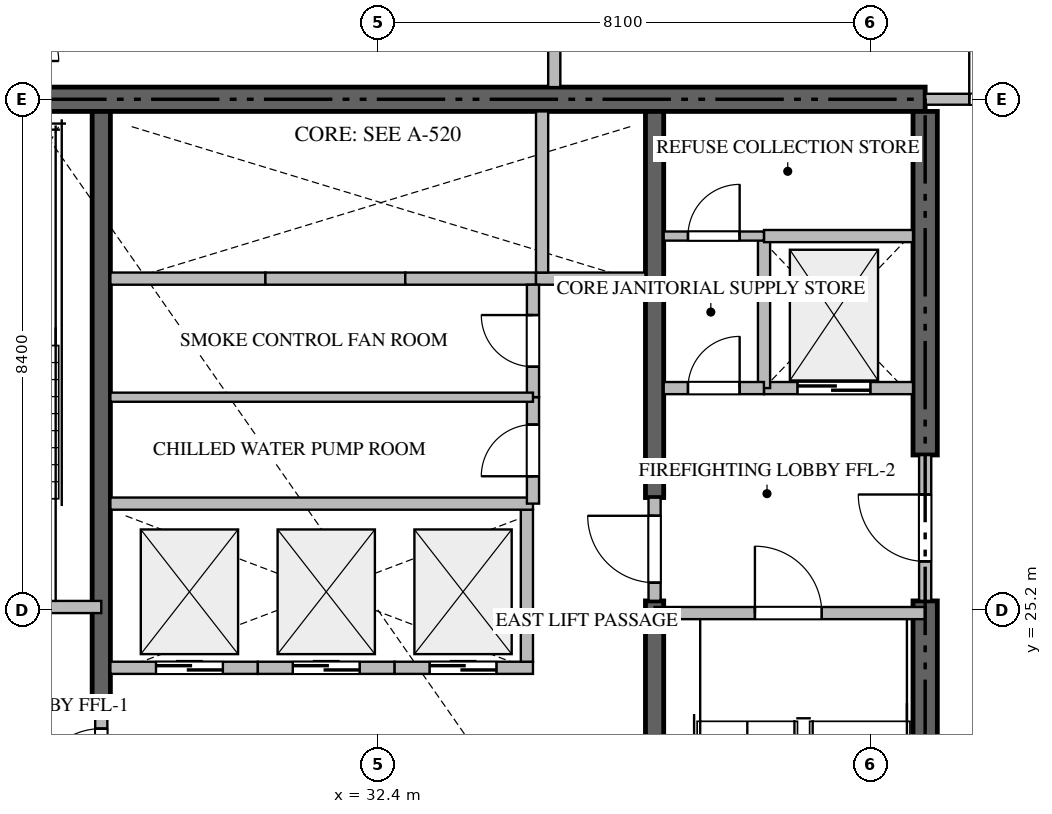
"""IFC4 building model, lengths in metres.
Left out: names, types, materials, properties, quantities, classifications, styles, units other than length and angle.
Written with IfcOpenShell. Run it as: python <this file> out.ifc"""

import sys

from ifc_helpers import new_model, si_unit, direction, frame, frame_2d, origin, place, context, subcontext, project, spatial, rectangle, extrude, source, transform, mapped, element, fill, save


model = new_model("IFC4")
c1 = context("Model", 3, precision=1e-05, world=origin(), true_north=direction((0.0, 1.0)))
c2 = subcontext(c1, "Body", "Model", "MODEL_VIEW")
j1 = project(units=[si_unit("LENGTHUNIT", "METRE"), si_unit("PLANEANGLEUNIT", "RADIAN")], contexts=[c1])
p1 = place(None, origin())
s1 = spatial("IfcSite", under=j1, at=p1, CompositionType="ELEMENT")
p2 = place(p1, origin())
s2 = spatial("IfcBuilding", under=s1, at=p2, CompositionType="ELEMENT")
p3 = place(p2, frame((0.0, 0.0, 191.4)))
s3 = spatial("IfcBuildingStorey", under=s2, at=p3, CompositionType="ELEMENT", Elevation=191.4)
p4 = place(p3, frame((41.4, 33.6, -0.26), z_axis=(0.0, 0.0, 1.0), x_axis=(-1.0, 0.0, 0.0)))
e1 = element("IfcWall", 1, at=p4, inside=s3, PredefinedType="SHEAR", context=c2, shape_type="SweptSolid", body=[
    extrude(rectangle(XDim=18.0, YDim=0.4, at=frame_2d((9.0, 0.0))), origin(), (0.0, 0.0, 1.0), 3.748),
])
p5 = place(p3, frame((41.4, 17.0, -0.26), z_axis=(0.0, 0.0, 1.0), x_axis=(0.0, 1.0, 0.0)))
e2 = element("IfcWall", 2, at=p5, inside=s3, PredefinedType="SHEAR", context=c2, shape_type="SweptSolid", body=[
    extrude(rectangle(XDim=8.35, YDim=0.4, at=frame_2d((4.175, 0.0))), origin(), (0.0, 0.0, 1.0), 3.748),
])
p6 = place(p3, frame((41.4, 27.75, -0.26), z_axis=(0.0, 0.0, 1.0), x_axis=(0.0, 1.0, 0.0)))
e3 = element("IfcWall", 3, at=p6, inside=s3, PredefinedType="SHEAR", context=c2, shape_type="SweptSolid", body=[
    extrude(rectangle(XDim=5.65, YDim=0.4, at=frame_2d((2.825, 0.0))), origin(), (0.0, 0.0, 1.0), 3.748),
])
p7 = place(p3, frame((27.85, 23.55, -0.26), z_axis=(0.0, 0.0, 1.0), x_axis=(0.0, 1.0, 0.0)))
e4 = element("IfcWall", 4, at=p7, inside=s3, PredefinedType="SHEAR", context=c2, shape_type="SweptSolid", body=[
    extrude(rectangle(XDim=9.85, YDim=0.3, at=frame_2d((4.925, 0.0))), origin(), (0.0, 0.0, 1.0), 3.748),
])
p8 = place(p3, frame((36.95, 17.0, -0.26), z_axis=(0.0, 0.0, 1.0), x_axis=(0.0, 1.0, 0.0)))
e5 = element("IfcWall", 5, at=p8, inside=s3, PredefinedType="SHEAR", context=c2, shape_type="SweptSolid", body=[
    extrude(rectangle(XDim=8.35, YDim=0.3, at=frame_2d((4.175, 0.0))), origin(), (0.0, 0.0, 1.0), 3.748),
])
p9 = place(p3, frame((36.95, 27.05, -0.26), z_axis=(0.0, 0.0, 1.0), x_axis=(0.0, 1.0, 0.0)))
e6 = element("IfcWall", 6, at=p9, inside=s3, PredefinedType="SHEAR", context=c2, shape_type="SweptSolid", body=[
    extrude(rectangle(XDim=6.35, YDim=0.3, at=frame_2d((3.175, 0.0))), origin(), (0.0, 0.0, 1.0), 3.748),
])
p10 = place(p3, frame((23.4, 25.25, 0.0), z_axis=(0.0, 0.0, 1.0), x_axis=(1.0, 0.0, 0.0)))
e7 = element("IfcWall", 7, at=p10, inside=s3, PredefinedType="STANDARD", context=c2, shape_type="SweptSolid", body=[
    extrude(rectangle(XDim=4.45, YDim=0.2, at=frame_2d((2.225, 0.0))), origin(), (0.0, 0.0, 1.0), 3.49),
])
p11 = place(p10, frame((1.65, 0.0, 0.0)))
e8 = element("IfcOpeningElement", 8, at=p11, cuts=e7, PredefinedType="OPENING", context=c2, shape_type="SweptSolid", body=[
    extrude(rectangle(XDim=1.1, YDim=2.15, at=frame_2d((0.55, 1.075))), frame((0.0, 0.11, 0.0), z_axis=(0.0, -1.0, 0.0), x_axis=(1.0, 0.0, 0.0)), (0.0, 0.0, 1.0), 0.22),
])
p12 = place(p3, frame((36.95, 25.15, 0.0), z_axis=(0.0, 0.0, 1.0), x_axis=(1.0, 0.0, 0.0)))
e9 = element("IfcWall", 9, at=p12, inside=s3, PredefinedType="STANDARD", context=c2, shape_type="SweptSolid", body=[
    extrude(rectangle(XDim=4.45, YDim=0.2, at=frame_2d((2.225, 0.0))), origin(), (0.0, 0.0, 1.0), 3.49),
])
p13 = place(p12, frame((1.65, 0.0, 0.0)))
e10 = element("IfcOpeningElement", 10, at=p13, cuts=e9, PredefinedType="OPENING", context=c2, shape_type="SweptSolid", body=[
    extrude(rectangle(XDim=1.1, YDim=2.15, at=frame_2d((0.55, 1.075))), frame((0.0, 0.11, 0.0), z_axis=(0.0, -1.0, 0.0), x_axis=(1.0, 0.0, 0.0)), (0.0, 0.0, 1.0), 0.22),
])
p14 = place(p3, frame((38.75, 28.85, 0.0), z_axis=(0.0, 0.0, 1.0), x_axis=(1.0, 0.0, 0.0)))
e11 = element("IfcWall", 11, at=p14, inside=s3, PredefinedType="STANDARD", context=c2, shape_type="SweptSolid", body=[
    extrude(rectangle(XDim=2.45, YDim=0.2, at=frame_2d((1.225, 0.0))), origin(), (0.0, 0.0, 1.0), 3.49),
])
p15 = place(p14, frame((0.55, 0.0, 0.0)))
e12 = element("IfcOpeningElement", 12, at=p15, cuts=e11, PredefinedType="OPENING", context=c2, shape_type="SweptSolid", body=[
    extrude(rectangle(XDim=1.2, YDim=2.2, at=frame_2d((0.6, 1.1))), frame((0.0, 0.11, 0.0), z_axis=(0.0, -1.0, 0.0), x_axis=(1.0, 0.0, 0.0)), (0.0, 0.0, 1.0), 0.22),
])
p16 = place(p3, frame((28.0, 24.25, 0.0), z_axis=(0.0, 0.0, 1.0), x_axis=(1.0, 0.0, 0.0)))
e13 = element("IfcWall", 13, at=p16, inside=s3, PredefinedType="STANDARD", context=c2, shape_type="SweptSolid", body=[
    extrude(rectangle(XDim=2.425, YDim=0.2, at=frame_2d((1.212, 0.0))), origin(), (0.0, 0.0, 1.0), 3.49),
])
p17 = place(p16, frame((0.75, 0.0, 0.0)))
e14 = element("IfcOpeningElement", 14, at=p17, cuts=e13, PredefinedType="OPENING", context=c2, shape_type="SweptSolid", body=[
    extrude(rectangle(XDim=1.1, YDim=2.2, at=frame_2d((0.55, 1.1))), frame((0.0, 0.11, 0.0), z_axis=(0.0, -1.0, 0.0), x_axis=(1.0, 0.0, 0.0)), (0.0, 0.0, 1.0), 0.22),
])
p18 = place(p3, frame((30.425, 24.25, 0.0), z_axis=(0.0, 0.0, 1.0), x_axis=(1.0, 0.0, 0.0)))
e15 = element("IfcWall", 15, at=p18, inside=s3, PredefinedType="STANDARD", context=c2, shape_type="SweptSolid", body=[
    extrude(rectangle(XDim=2.25, YDim=0.2, at=frame_2d((1.125, 0.0))), origin(), (0.0, 0.0, 1.0), 3.49),
])
p19 = place(p18, frame((0.575, 0.0, 0.0)))
e16 = element("IfcOpeningElement", 16, at=p19, cuts=e15, PredefinedType="OPENING", context=c2, shape_type="SweptSolid", body=[
    extrude(rectangle(XDim=1.1, YDim=2.2, at=frame_2d((0.55, 1.1))), frame((0.0, 0.11, 0.0), z_axis=(0.0, -1.0, 0.0), x_axis=(1.0, 0.0, 0.0)), (0.0, 0.0, 1.0), 0.22),
])
p20 = place(p3, frame((32.675, 24.25, 0.0), z_axis=(0.0, 0.0, 1.0), x_axis=(1.0, 0.0, 0.0)))
e17 = element("IfcWall", 17, at=p20, inside=s3, PredefinedType="STANDARD", context=c2, shape_type="SweptSolid", body=[
    extrude(rectangle(XDim=2.275, YDim=0.2, at=frame_2d((1.137, 0.0))), origin(), (0.0, 0.0, 1.0), 3.49),
])
p21 = place(p20, frame((0.575, 0.0, 0.0)))
e18 = element("IfcOpeningElement", 18, at=p21, cuts=e17, PredefinedType="OPENING", context=c2, shape_type="SweptSolid", body=[
    extrude(rectangle(XDim=1.1, YDim=2.2, at=frame_2d((0.55, 1.1))), frame((0.0, 0.11, 0.0), z_axis=(0.0, -1.0, 0.0), x_axis=(1.0, 0.0, 0.0)), (0.0, 0.0, 1.0), 0.22),
])
p22 = place(p3, frame((34.85, 24.35, 0.0), z_axis=(0.0, 0.0, 1.0), x_axis=(0.0, 1.0, 0.0)))
e19 = element("IfcWall", 19, at=p22, inside=s3, PredefinedType="STANDARD", context=c2, shape_type="SweptSolid", body=[
    extrude(rectangle(XDim=2.5, YDim=0.2, at=frame_2d((1.25, 0.0))), origin(), (0.0, 0.0, 1.0), 3.49),
])
p23 = place(p3, frame((28.0, 30.65, 0.0), z_axis=(0.0, 0.0, 1.0), x_axis=(1.0, 0.0, 0.0)))
e20 = element("IfcWall", 20, at=p23, inside=s3, PredefinedType="STANDARD", context=c2, shape_type="SweptSolid", body=[
    extrude(rectangle(XDim=2.55, YDim=0.2, at=frame_2d((1.275, 0.0))), origin(), (0.0, 0.0, 1.0), 3.49),
])
p24 = place(p3, frame((30.55, 30.65, 0.0), z_axis=(0.0, 0.0, 1.0), x_axis=(1.0, 0.0, 0.0)))
e21 = element("IfcWall", 21, at=p24, inside=s3, PredefinedType="STANDARD", context=c2, shape_type="SweptSolid", body=[
    extrude(rectangle(XDim=2.3, YDim=0.2, at=frame_2d((1.15, 0.0))), origin(), (0.0, 0.0, 1.0), 3.49),
])
p25 = place(p3, frame((32.85, 30.65, 0.0), z_axis=(0.0, 0.0, 1.0), x_axis=(1.0, 0.0, 0.0)))
e22 = element("IfcWall", 22, at=p25, inside=s3, PredefinedType="STANDARD", context=c2, shape_type="SweptSolid", body=[
    extrude(rectangle(XDim=2.15, YDim=0.2, at=frame_2d((1.075, 0.0))), origin(), (0.0, 0.0, 1.0), 3.49),
])
p26 = place(p3, frame((35.0, 30.65, 0.0), z_axis=(0.0, 0.0, 1.0), x_axis=(1.0, 0.0, 0.0)))
e23 = element("IfcWall", 23, at=p26, inside=s3, PredefinedType="STANDARD", context=c2, shape_type="SweptSolid", body=[
    extrude(rectangle(XDim=1.8, YDim=0.2, at=frame_2d((0.9, 0.0))), origin(), (0.0, 0.0, 1.0), 3.49),
])
p27 = place(p3, frame((35.1, 30.75, 0.0), z_axis=(0.0, 0.0, 1.0), x_axis=(0.0, 1.0, 0.0)))
e24 = element("IfcWall", 24, at=p27, inside=s3, PredefinedType="STANDARD", context=c2, shape_type="SweptSolid", body=[
    extrude(rectangle(XDim=2.65, YDim=0.2, at=frame_2d((1.325, 0.0))), origin(), (0.0, 0.0, 1.0), 3.49),
])
p28 = place(p3, frame((38.75, 28.85, 0.0), z_axis=(0.0, 0.0, 1.0), x_axis=(0.0, 1.0, 0.0)))
e25 = element("IfcWall", 25, at=p28, inside=s3, PredefinedType="STANDARD", context=c2, shape_type="SweptSolid", body=[
    extrude(rectangle(XDim=2.5, YDim=0.2, at=frame_2d((1.25, 0.0))), origin(), (0.0, 0.0, 1.0), 3.49),
])
p29 = place(p3, frame((38.75, 31.35, 0.0), z_axis=(0.0, 0.0, 1.0), x_axis=(1.0, 0.0, 0.0)))
e26 = element("IfcWall", 26, at=p29, inside=s3, PredefinedType="STANDARD", context=c2, shape_type="SweptSolid", body=[
    extrude(rectangle(XDim=2.45, YDim=0.2, at=frame_2d((1.225, 0.0))), origin(), (0.0, 0.0, 1.0), 3.49),
])
p30 = place(p3, frame((37.1, 28.85, 0.0), z_axis=(0.0, 0.0, 1.0), x_axis=(1.0, 0.0, 0.0)))
e27 = element("IfcWall", 27, at=p30, inside=s3, PredefinedType="STANDARD", context=c2, shape_type="SweptSolid", body=[
    extrude(rectangle(XDim=1.648, YDim=0.2, at=frame_2d((0.824, 0.0))), origin(), (0.0, 0.0, 1.0), 3.49),
])
p31 = place(p30, frame((0.399, 0.0, 0.0)))
e28 = element("IfcOpeningElement", 28, at=p31, cuts=e27, PredefinedType="OPENING", context=c2, shape_type="SweptSolid", body=[
    extrude(rectangle(XDim=0.85, YDim=2.1, at=frame_2d((0.425, 1.05))), frame((0.0, 0.11, 0.0), z_axis=(0.0, -1.0, 0.0), x_axis=(1.0, 0.0, 0.0)), (0.0, 0.0, 1.0), 0.22),
])
p32 = place(p3, frame((41.4, 25.352, 0.0), z_axis=(0.0, 0.0, 1.0), x_axis=(0.0, 1.0, 0.0)))
e29 = element("IfcWall", 29, at=p32, inside=s3, PredefinedType="STANDARD", context=c2, shape_type="SweptSolid", body=[
    extrude(rectangle(XDim=2.396, YDim=0.2, at=frame_2d((1.198, 0.0))), origin(), (0.0, 0.0, 1.0), 3.49),
])
p33 = place(p32, frame((0.648, 0.0, 0.0)))
e30 = element("IfcOpeningElement", 30, at=p33, cuts=e29, PredefinedType="OPENING", context=c2, shape_type="SweptSolid", body=[
    extrude(rectangle(XDim=1.1, YDim=2.15, at=frame_2d((0.55, 1.075))), frame((0.0, 0.11, 0.0), z_axis=(0.0, -1.0, 0.0), x_axis=(1.0, 0.0, 0.0)), (0.0, 0.0, 1.0), 0.22),
])
p34 = place(p3, frame((27.85, 21.852, 0.0), z_axis=(0.0, 0.0, 1.0), x_axis=(0.0, 1.0, 0.0)))
e31 = element("IfcWall", 31, at=p34, inside=s3, PredefinedType="STANDARD", context=c2, shape_type="SweptSolid", body=[
    extrude(rectangle(XDim=1.696, YDim=0.2, at=frame_2d((0.848, 0.0))), origin(), (0.0, 0.0, 1.0), 3.49),
])
p35 = place(p34, frame((0.298, 0.0, 0.0)))
e32 = element("IfcOpeningElement", 32, at=p35, cuts=e31, PredefinedType="OPENING", context=c2, shape_type="SweptSolid", body=[
    extrude(rectangle(XDim=1.1, YDim=2.15, at=frame_2d((0.55, 1.075))), frame((0.0, 0.11, 0.0), z_axis=(0.0, -1.0, 0.0), x_axis=(1.0, 0.0, 0.0)), (0.0, 0.0, 1.0), 0.22),
])
p36 = place(p3, frame((36.95, 25.352, 0.0), z_axis=(0.0, 0.0, 1.0), x_axis=(0.0, 1.0, 0.0)))
e33 = element("IfcWall", 33, at=p36, inside=s3, PredefinedType="STANDARD", context=c2, shape_type="SweptSolid", body=[
    extrude(rectangle(XDim=1.696, YDim=0.2, at=frame_2d((0.848, 0.0))), origin(), (0.0, 0.0, 1.0), 3.49),
])
p37 = place(p36, frame((0.298, 0.0, 0.0)))
e34 = element("IfcOpeningElement", 34, at=p37, cuts=e33, PredefinedType="OPENING", context=c2, shape_type="SweptSolid", body=[
    extrude(rectangle(XDim=1.1, YDim=2.15, at=frame_2d((0.55, 1.075))), frame((0.0, 0.11, 0.0), z_axis=(0.0, -1.0, 0.0), x_axis=(1.0, 0.0, 0.0)), (0.0, 0.0, 1.0), 0.22),
])
p38 = place(p3, frame((28.0, 26.95, 0.0), z_axis=(0.0, 0.0, 1.0), x_axis=(1.0, 0.0, 0.0)))
e35 = element("IfcWall", 35, at=p38, inside=s3, PredefinedType="STANDARD", context=c2, shape_type="SweptSolid", body=[
    extrude(rectangle(XDim=6.95, YDim=0.2, at=frame_2d((3.475, 0.0))), origin(), (0.0, 0.0, 1.0), 3.49),
])
p39 = place(p3, frame((37.1, 31.35, 0.0), z_axis=(0.0, 0.0, 1.0), x_axis=(1.0, 0.0, 0.0)))
e36 = element("IfcWall", 36, at=p39, inside=s3, PredefinedType="PARTITIONING", context=c2, shape_type="SweptSolid", body=[
    extrude(rectangle(XDim=1.648, YDim=0.15, at=frame_2d((0.824, 0.0))), origin(), (0.0, 0.0, 1.0), 3.49),
])
p40 = place(p39, frame((0.399, 0.0, 0.0)))
e37 = element("IfcOpeningElement", 37, at=p40, cuts=e36, PredefinedType="OPENING", context=c2, shape_type="SweptSolid", body=[
    extrude(rectangle(XDim=0.85, YDim=2.1, at=frame_2d((0.425, 1.05))), frame((0.0, 0.085, 0.0), z_axis=(0.0, -1.0, 0.0), x_axis=(1.0, 0.0, 0.0)), (0.0, 0.0, 1.0), 0.17),
])
p41 = place(p3, frame((34.95, 26.95, 0.0), z_axis=(0.0, 0.0, 1.0), x_axis=(0.0, 1.0, 0.0)))
e38 = element("IfcWall", 38, at=p41, inside=s3, PredefinedType="STANDARD", context=c2, shape_type="SweptSolid", body=[
    extrude(rectangle(XDim=1.75, YDim=0.2, at=frame_2d((0.875, 0.0))), origin(), (0.0, 0.0, 1.0), 3.49),
])
p42 = place(p41, frame((0.45, 0.0, 0.0)))
e39 = element("IfcOpeningElement", 39, at=p42, cuts=e38, PredefinedType="OPENING", context=c2, shape_type="SweptSolid", body=[
    extrude(rectangle(XDim=0.85, YDim=2.1, at=frame_2d((0.425, 1.05))), frame((0.0, 0.11, 0.0), z_axis=(0.0, -1.0, 0.0), x_axis=(1.0, 0.0, 0.0)), (0.0, 0.0, 1.0), 0.22),
])
p43 = place(p3, frame((34.95, 28.702, 0.0), z_axis=(0.0, 0.0, 1.0), x_axis=(0.0, 1.0, 0.0)))
e40 = element("IfcWall", 40, at=p43, inside=s3, PredefinedType="STANDARD", context=c2, shape_type="SweptSolid", body=[
    extrude(rectangle(XDim=1.848, YDim=0.2, at=frame_2d((0.924, 0.0))), origin(), (0.0, 0.0, 1.0), 3.49),
])
p44 = place(p43, frame((0.499, 0.0, 0.0)))
e41 = element("IfcOpeningElement", 41, at=p44, cuts=e40, PredefinedType="OPENING", context=c2, shape_type="SweptSolid", body=[
    extrude(rectangle(XDim=0.85, YDim=2.1, at=frame_2d((0.425, 1.05))), frame((0.0, 0.11, 0.0), z_axis=(0.0, -1.0, 0.0), x_axis=(1.0, 0.0, 0.0)), (0.0, 0.0, 1.0), 0.22),
])
p45 = place(p3, frame((28.0, 28.7, 0.0), z_axis=(0.0, 0.0, 1.0), x_axis=(1.0, 0.0, 0.0)))
e42 = element("IfcWall", 42, at=p45, inside=s3, PredefinedType="PARTITIONING", context=c2, shape_type="SweptSolid", body=[
    extrude(rectangle(XDim=6.95, YDim=0.15, at=frame_2d((3.475, 0.0))), origin(), (0.0, 0.0, 1.0), 3.49),
])
p46 = place(p3, frame((35.3, 33.8, 0.0), z_axis=(0.0, 0.0, 1.0), x_axis=(0.0, 1.0, 0.0)))
e43 = element("IfcWall", 43, at=p46, inside=s3, PredefinedType="PARTITIONING", context=c2, shape_type="SweptSolid", body=[
    extrude(rectangle(XDim=15.118, YDim=0.2, at=frame_2d((7.559, 0.0))), origin(), (0.0, 0.0, 1.0), 3.49),
])
p47 = place(p3, frame((41.402, 33.6, 0.0), z_axis=(0.0, 0.0, 1.0), x_axis=(1.0, 0.0, 0.0)))
e44 = element("IfcWall", 44, at=p47, inside=s3, PredefinedType="PARTITIONING", context=c2, shape_type="SweptSolid", body=[
    extrude(rectangle(XDim=2.446, YDim=0.18, at=frame_2d((1.223, 0.0))), origin(), (0.0, 0.0, 1.0), 3.49),
])
p48 = place(p47, frame((0.723, 0.0, 0.0)))
e45 = element("IfcOpeningElement", 45, at=p48, cuts=e44, PredefinedType="OPENING", context=c2, shape_type="SweptSolid", body=[
    extrude(rectangle(XDim=1.0, YDim=2.15, at=frame_2d((0.5, 1.075))), frame((0.0, 0.1, 0.0), z_axis=(0.0, -1.0, 0.0), x_axis=(1.0, 0.0, 0.0)), (0.0, 0.0, 1.0), 0.2),
])
m1 = source(origin(), c2, "Body", "SweptSolid", [
    extrude(rectangle(XDim=1.1, YDim=2.15, at=frame_2d((0.55, 1.075))), frame((0.0, 0.025, 0.0), z_axis=(0.0, -1.0, 0.0), x_axis=(1.0, 0.0, 0.0)), (0.0, 0.0, 1.0), 0.05),
])
p49 = place(p13, origin())
e46 = element("IfcDoor", 46, at=p49, inside=s3, OperationType="SINGLE_SWING_LEFT", PredefinedType="DOOR", context=c2, shape_type="MappedRepresentation", body=[
    mapped(m1, transform((0.0, 0.0, 0.0), scale=1.0)),
])
fill(e10, e46)
m2 = source(origin(), c2, "Body", "SweptSolid", [
    extrude(rectangle(XDim=1.2, YDim=2.2, at=frame_2d((0.6, 1.1))), frame((0.0, 0.025, 0.0), z_axis=(0.0, -1.0, 0.0), x_axis=(1.0, 0.0, 0.0)), (0.0, 0.0, 1.0), 0.05),
])
p50 = place(p15, origin())
e47 = element("IfcDoor", 47, at=p50, inside=s3, OperationType="DOUBLE_DOOR_SLIDING", PredefinedType="DOOR", context=c2, shape_type="MappedRepresentation", body=[
    mapped(m2, transform((0.0, 0.0, 0.0), scale=1.0)),
])
fill(e12, e47)
m3 = source(origin(), c2, "Body", "SweptSolid", [
    extrude(rectangle(XDim=1.1, YDim=2.2, at=frame_2d((0.55, 1.1))), frame((0.0, 0.025, 0.0), z_axis=(0.0, -1.0, 0.0), x_axis=(1.0, 0.0, 0.0)), (0.0, 0.0, 1.0), 0.05),
])
p51 = place(p17, origin())
e48 = element("IfcDoor", 48, at=p51, inside=s3, OperationType="DOUBLE_DOOR_SLIDING", PredefinedType="DOOR", context=c2, shape_type="MappedRepresentation", body=[
    mapped(m3, transform((0.0, 0.0, 0.0), scale=1.0)),
])
fill(e14, e48)
p52 = place(p19, origin())
e49 = element("IfcDoor", 49, at=p52, inside=s3, OperationType="DOUBLE_DOOR_SLIDING", PredefinedType="DOOR", context=c2, shape_type="MappedRepresentation", body=[
    mapped(m3, transform((0.0, 0.0, 0.0), scale=1.0)),
])
fill(e16, e49)
p53 = place(p21, origin())
e50 = element("IfcDoor", 50, at=p53, inside=s3, OperationType="DOUBLE_DOOR_SLIDING", PredefinedType="DOOR", context=c2, shape_type="MappedRepresentation", body=[
    mapped(m3, transform((0.0, 0.0, 0.0), scale=1.0)),
])
fill(e18, e50)
m4 = source(origin(), c2, "Body", "SweptSolid", [
    extrude(rectangle(XDim=0.85, YDim=2.1, at=frame_2d((0.425, 1.05))), frame((0.0, 0.025, 0.0), z_axis=(0.0, -1.0, 0.0), x_axis=(1.0, 0.0, 0.0)), (0.0, 0.0, 1.0), 0.05),
])
p54 = place(p31, origin())
e51 = element("IfcDoor", 51, at=p54, inside=s3, OperationType="SINGLE_SWING_RIGHT", PredefinedType="DOOR", context=c2, shape_type="MappedRepresentation", body=[
    mapped(m4, transform((0.0, 0.0, 0.0), scale=1.0)),
])
fill(e28, e51)
p55 = place(p33, origin())
e52 = element("IfcDoor", 52, at=p55, inside=s3, OperationType="SINGLE_SWING_RIGHT", PredefinedType="DOOR", context=c2, shape_type="MappedRepresentation", body=[
    mapped(m1, transform((0.0, 0.0, 0.0), scale=1.0)),
])
fill(e30, e52)
p56 = place(p35, origin())
e53 = element("IfcDoor", 53, at=p56, inside=s3, OperationType="SINGLE_SWING_LEFT", PredefinedType="DOOR", context=c2, shape_type="MappedRepresentation", body=[
    mapped(m1, transform((0.0, 0.0, 0.0), scale=1.0)),
])
fill(e32, e53)
p57 = place(p37, origin())
e54 = element("IfcDoor", 54, at=p57, inside=s3, OperationType="SINGLE_SWING_RIGHT", PredefinedType="DOOR", context=c2, shape_type="MappedRepresentation", body=[
    mapped(m1, transform((0.0, 0.0, 0.0), scale=1.0)),
])
fill(e34, e54)
p58 = place(p40, origin())
e55 = element("IfcDoor", 55, at=p58, inside=s3, OperationType="SINGLE_SWING_RIGHT", PredefinedType="DOOR", context=c2, shape_type="MappedRepresentation", body=[
    mapped(m4, transform((0.0, 0.0, 0.0), scale=1.0)),
])
fill(e37, e55)
p59 = place(p42, origin())
e56 = element("IfcDoor", 56, at=p59, inside=s3, OperationType="SINGLE_SWING_LEFT", PredefinedType="DOOR", context=c2, shape_type="MappedRepresentation", body=[
    mapped(m4, transform((0.0, 0.0, 0.0), scale=1.0)),
])
fill(e39, e56)
p60 = place(p44, origin())
e57 = element("IfcDoor", 57, at=p60, inside=s3, OperationType="SINGLE_SWING_RIGHT", PredefinedType="DOOR", context=c2, shape_type="MappedRepresentation", body=[
    mapped(m4, transform((0.0, 0.0, 0.0), scale=1.0)),
])
fill(e41, e57)
m5 = source(origin(), c2, "Body", "SweptSolid", [
    extrude(rectangle(XDim=1.0, YDim=2.15, at=frame_2d((0.5, 1.075))), frame((0.0, 0.025, 0.0), z_axis=(0.0, -1.0, 0.0), x_axis=(1.0, 0.0, 0.0)), (0.0, 0.0, 1.0), 0.05),
])
p61 = place(p48, origin())
e58 = element("IfcDoor", 58, at=p61, inside=s3, OperationType="SINGLE_SWING_LEFT", PredefinedType="DOOR", context=c2, shape_type="MappedRepresentation", body=[
    mapped(m5, transform((0.0, 0.0, 0.0), scale=1.0)),
])
fill(e45, e58)
save(model, sys.argv[1])
